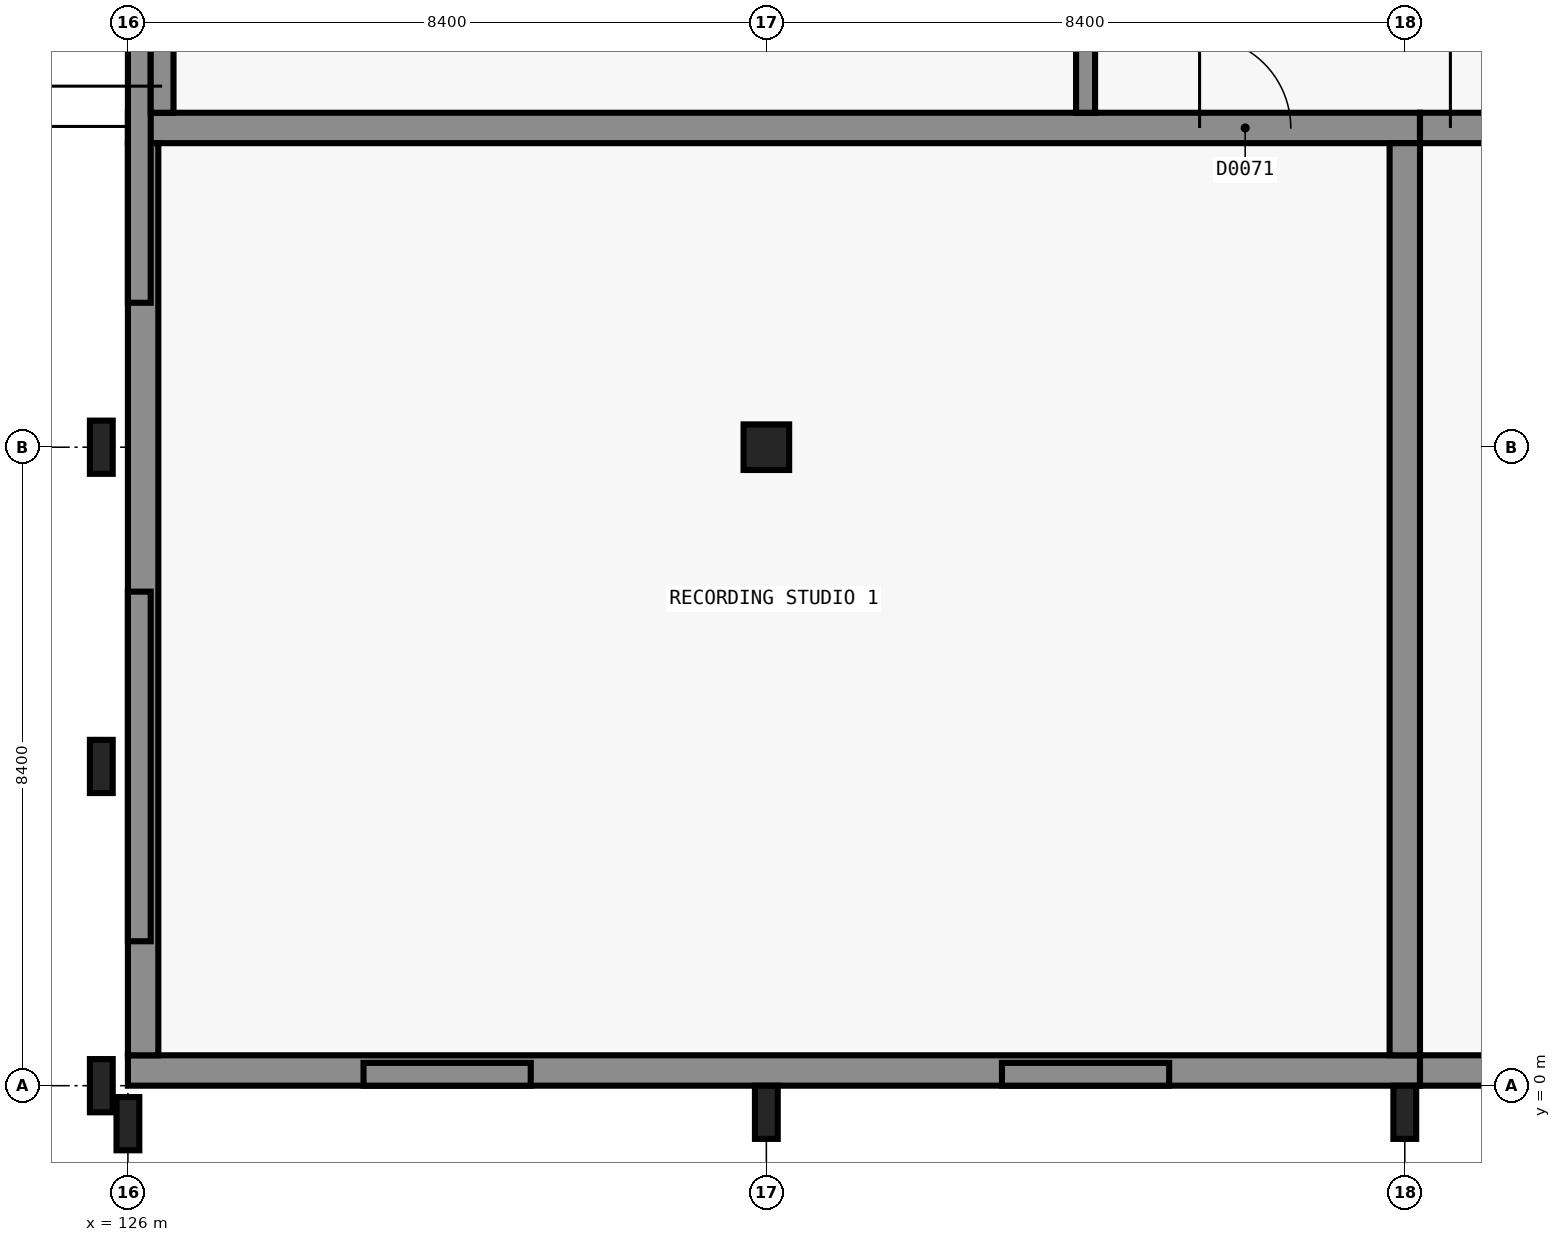
"""IFC4 building model, lengths in metres.
Left out: names, types, materials, properties, quantities, classifications, styles, units other than length and angle.
Written with IfcOpenShell. Run it as: python <this file> out.ifc"""

import sys

from ifc_helpers import new_model, si_unit, direction, frame, frame_2d, origin, origin_2d, place, context, subcontext, project, spatial, rectangle, extrude, element, fill, save


model = new_model("IFC4")
c1 = context("Model", 3, precision=1e-05, world=origin(), true_north=direction((0.0, 1.0)))
c2 = subcontext(c1, "Body", "Model", "MODEL_VIEW")
j1 = project(units=[si_unit("LENGTHUNIT", "METRE"), si_unit("PLANEANGLEUNIT", "RADIAN")], contexts=[c1])
p1 = place(None, origin())
s1 = spatial("IfcSite", under=j1, at=p1, CompositionType="ELEMENT")
p2 = place(p1, origin())
s2 = spatial("IfcBuilding", under=s1, at=p2, CompositionType="ELEMENT")
p3 = place(p2, origin())
s3 = spatial("IfcBuildingStorey", under=s2, at=p3, CompositionType="ELEMENT", Elevation=0.0)
p4 = place(p3, frame((143.0, 0.2, -0.3), z_axis=(0.0, 0.0, 1.0), x_axis=(-1.0, 0.0, 0.0)))
e1 = element("IfcWall", 1, at=p4, inside=s3, PredefinedType="SHEAR", context=c2, shape_type="SweptSolid", body=[
    extrude(rectangle(XDim=17.0, YDim=0.4, at=frame_2d((8.5, 0.0))), origin(), (0.0, 0.0, 1.0), 5.7),
])
p5 = place(p3, frame((126.0, 12.6, -0.3), z_axis=(0.0, 0.0, 1.0), x_axis=(1.0, 0.0, 0.0)))
e2 = element("IfcWall", 2, at=p5, inside=s3, PredefinedType="SHEAR", context=c2, shape_type="SweptSolid", body=[
    extrude(rectangle(XDim=17.0, YDim=0.4, at=frame_2d((8.5, 0.0))), origin(), (0.0, 0.0, 1.0), 5.7),
])
p6 = place(p5, frame((14.1, 0.0, 0.3)))
e3 = element("IfcOpeningElement", 3, at=p6, cuts=e2, PredefinedType="OPENING", context=c2, shape_type="SweptSolid", body=[
    extrude(rectangle(XDim=1.2, YDim=2.1, at=frame_2d((0.6, 1.05))), frame((0.0, 0.21, 0.0), z_axis=(0.0, -1.0, 0.0), x_axis=(1.0, 0.0, 0.0)), (0.0, 0.0, 1.0), 0.42),
])
for number, where, z_axis, x_axis in (
    (4, (126.2, 0.4, -0.3), (0.0, 0.0, 1.0), (0.0, 1.0, 0.0)),
    (5, (142.8, 12.4, -0.3), (0.0, 0.0, 1.0), (0.0, -1.0, 0.0)),
):
    element("IfcWall", number, at=place(p3, frame(where, z_axis=z_axis, x_axis=x_axis)), inside=s3, PredefinedType="SHEAR", context=c2, shape_type="SweptSolid", body=[
        extrude(rectangle(XDim=12.0, YDim=0.4, at=frame_2d((6.0, 0.0))), origin(), (0.0, 0.0, 1.0), 5.7),
    ])
p7 = place(p3, frame((168.0, 0.2, -0.3), z_axis=(0.0, 0.0, 1.0), x_axis=(-1.0, 0.0, 0.0)))
e6 = element("IfcWall", 6, at=p7, inside=s3, PredefinedType="SHEAR", context=c2, shape_type="SweptSolid", body=[
    extrude(rectangle(XDim=25.0, YDim=0.4, at=frame_2d((12.5, 0.0))), origin(), (0.0, 0.0, 1.0), 5.7),
])
p8 = place(p3, frame((143.0, 12.6, -0.3), z_axis=(0.0, 0.0, 1.0), x_axis=(1.0, 0.0, 0.0)))
e7 = element("IfcWall", 7, at=p8, inside=s3, PredefinedType="SHEAR", context=c2, shape_type="SweptSolid", body=[
    extrude(rectangle(XDim=25.0, YDim=0.4, at=frame_2d((12.5, 0.0))), origin(), (0.0, 0.0, 1.0), 5.7),
])
p9 = place(p8, frame((0.4, 0.0, 0.3)))
e8 = element("IfcOpeningElement", 8, at=p9, cuts=e7, PredefinedType="OPENING", context=c2, shape_type="SweptSolid", body=[
    extrude(rectangle(XDim=1.8, YDim=2.3, at=frame_2d((0.9, 1.15))), frame((0.0, 0.21, 0.0), z_axis=(0.0, -1.0, 0.0), x_axis=(1.0, 0.0, 0.0)), (0.0, 0.0, 1.0), 0.42),
])
p10 = place(p3, frame((134.4, 8.4, -0.3), z_axis=(0.0, 0.0, 1.0), x_axis=(1.0, 0.0, 0.0)))
e9 = element("IfcColumn", 9, at=p10, inside=s3, PredefinedType="COLUMN", context=c2, shape_type="SweptSolid", body=[
    extrude(rectangle(XDim=0.6, YDim=0.6, at=origin_2d()), origin(), (0.0, 0.0, 1.0), 5.7),
])
p11 = place(p3, frame((126.15, 1.9, -1.2), z_axis=(0.0, 0.0, 1.0), x_axis=(0.0, 1.0, 0.0)))
e10 = element("IfcWall", 10, at=p11, inside=s3, PredefinedType="SOLIDWALL", context=c2, shape_type="SweptSolid", body=[
    extrude(rectangle(XDim=4.6, YDim=0.3, at=frame_2d((2.3, 0.0))), origin(), (0.0, 0.0, 1.0), 0.9),
])
p12 = place(p3, frame((126.15, 10.3, -1.2), z_axis=(0.0, 0.0, 1.0), x_axis=(0.0, 1.0, 0.0)))
e11 = element("IfcWall", 11, at=p12, inside=s3, PredefinedType="SOLIDWALL", context=c2, shape_type="SweptSolid", body=[
    extrude(rectangle(XDim=6.3, YDim=0.3, at=frame_2d((3.15, 0.0))), origin(), (0.0, 0.0, 1.0), 0.9),
])
for number, where, z_axis, x_axis in (
    (12, (131.3, 0.15, -1.2), (0.0, 0.0, 1.0), (-1.0, 0.0, 0.0)),
    (13, (139.7, 0.15, -1.2), (0.0, 0.0, 1.0), (-1.0, 0.0, 0.0)),
):
    element("IfcWall", number, at=place(p3, frame(where, z_axis=z_axis, x_axis=x_axis)), inside=s3, PredefinedType="SOLIDWALL", context=c2, shape_type="SweptSolid", body=[
        extrude(rectangle(XDim=2.2, YDim=0.3, at=frame_2d((1.1, 0.0))), origin(), (0.0, 0.0, 1.0), 0.9),
    ])
for number, where, z_axis, x_axis in (
    (14, (126.0, -0.5, -0.3), (0.0, 0.0, 1.0), (1.0, 0.0, 0.0)),
    (15, (134.4, -0.35, -0.3), (0.0, 0.0, 1.0), (1.0, 0.0, 0.0)),
    (16, (142.8, -0.35, -0.3), (0.0, 0.0, 1.0), (1.0, 0.0, 0.0)),
):
    element("IfcColumn", number, at=place(p3, frame(where, z_axis=z_axis, x_axis=x_axis)), inside=s3, PredefinedType="PILASTER", context=c2, shape_type="SweptSolid", body=[
        extrude(rectangle(XDim=0.3, YDim=0.7, at=origin_2d()), origin(), (0.0, 0.0, 1.0), 5.7),
    ])
p13 = place(p3, frame((126.45, 12.8, 0.0), z_axis=(0.0, 0.0, 1.0), x_axis=(0.0, 1.0, 0.0)))
e17 = element("IfcWall", 17, at=p13, inside=s3, PredefinedType="SOLIDWALL", context=c2, shape_type="SweptSolid", body=[
    extrude(rectangle(XDim=3.8, YDim=0.3, at=frame_2d((1.9, 0.0))), origin(), (0.0, 0.0, 1.0), 5.1),
])
p14 = place(p13, frame((0.35, 0.0, 0.0)))
e18 = element("IfcOpeningElement", 18, at=p14, cuts=e17, PredefinedType="OPENING", context=c2, shape_type="SweptSolid", body=[
    extrude(rectangle(XDim=2.4, YDim=2.4, at=frame_2d((1.2, 1.2))), frame((0.0, 0.16, 0.0), z_axis=(0.0, -1.0, 0.0), x_axis=(1.0, 0.0, 0.0)), (0.0, 0.0, 1.0), 0.32),
])
for number, where, z_axis, x_axis in (
    (19, (125.65, 0.0, -0.3), (0.0, 0.0, 1.0), (0.0, 1.0, 0.0)),
    (20, (125.65, 4.2, -0.3), (0.0, 0.0, 1.0), (0.0, 1.0, 0.0)),
    (21, (125.65, 8.4, -0.3), (0.0, 0.0, 1.0), (0.0, 1.0, 0.0)),
):
    element("IfcColumn", number, at=place(p3, frame(where, z_axis=z_axis, x_axis=x_axis)), inside=s3, PredefinedType="PILASTER", context=c2, shape_type="SweptSolid", body=[
        extrude(rectangle(XDim=0.3, YDim=0.7, at=origin_2d()), origin(), (0.0, 0.0, 1.0), 5.7),
    ])
p15 = place(p3, frame((138.6, 12.8, 0.0), z_axis=(0.0, 0.0, 1.0), x_axis=(0.0, 1.0, 0.0)))
e22 = element("IfcWall", 22, at=p15, inside=s3, PredefinedType="PARTITIONING", context=c2, shape_type="SweptSolid", body=[
    extrude(rectangle(XDim=3.875, YDim=0.25, at=frame_2d((1.938, 0.0))), origin(), (0.0, 0.0, 1.0), 4.4),
])
p16 = place(p14, origin())
e23 = element("IfcDoor", 23, at=p16, inside=s3, OperationType="DOUBLE_DOOR_DOUBLE_SWING", PredefinedType="DOOR", context=c2, shape_type="SweptSolid", body=[
    extrude(rectangle(XDim=2.4, YDim=2.4, at=frame_2d((1.2, 1.2))), frame((0.0, 0.025, 0.0), z_axis=(0.0, -1.0, 0.0), x_axis=(1.0, 0.0, 0.0)), (0.0, 0.0, 1.0), 0.05),
])
fill(e18, e23)
p17 = place(p6, origin())
e24 = element("IfcDoor", 24, at=p17, inside=s3, OperationType="SINGLE_SWING_LEFT", PredefinedType="DOOR", context=c2, shape_type="SweptSolid", body=[
    extrude(rectangle(XDim=1.2, YDim=2.1, at=frame_2d((0.6, 1.05))), frame((0.0, 0.025, 0.0), z_axis=(0.0, -1.0, 0.0), x_axis=(1.0, 0.0, 0.0)), (0.0, 0.0, 1.0), 0.05),
])
fill(e3, e24)
p18 = place(p9, origin())
e25 = element("IfcDoor", 25, at=p18, inside=s3, OperationType="DOUBLE_DOOR_SINGLE_SWING", PredefinedType="DOOR", context=c2, shape_type="SweptSolid", body=[
    extrude(rectangle(XDim=1.8, YDim=2.3, at=frame_2d((0.9, 1.15))), frame((0.0, 0.025, 0.0), z_axis=(0.0, -1.0, 0.0), x_axis=(1.0, 0.0, 0.0)), (0.0, 0.0, 1.0), 0.05),
])
fill(e8, e25)
save(model, sys.argv[1])
